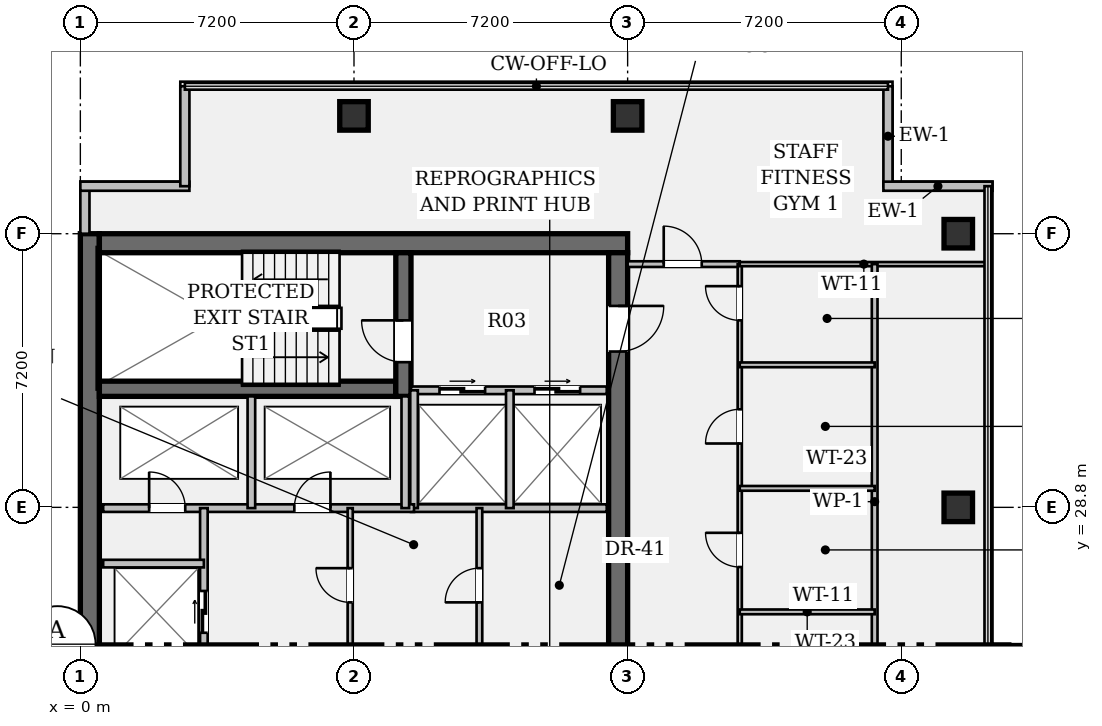
"""IFC4 building model, lengths in metres.
Left out: names, types, materials, properties, quantities, classifications, styles, units other than length and angle.
Written with IfcOpenShell. Run it as: python <this file> out.ifc"""

import sys

from ifc_helpers import new_model, si_unit, direction, frame, frame_2d, origin, origin_2d, place, context, subcontext, project, spatial, rectangle, hollow_rectangle, extrude, element, fill, save


model = new_model("IFC4")
c1 = context("Model", 3, precision=1e-05, world=origin(), true_north=direction((0.0, 1.0)))
c2 = subcontext(c1, "Body", "Model", "MODEL_VIEW")
j1 = project(units=[si_unit("LENGTHUNIT", "METRE"), si_unit("PLANEANGLEUNIT", "RADIAN")], contexts=[c1])
p1 = place(None, origin())
s1 = spatial("IfcSite", under=j1, at=p1, CompositionType="ELEMENT")
p2 = place(p1, origin())
s2 = spatial("IfcBuilding", under=s1, at=p2, CompositionType="ELEMENT")
p3 = place(p2, frame((0.0, 0.0, 208.25)))
s3 = spatial("IfcBuildingStorey", under=s2, at=p3, CompositionType="ELEMENT", Elevation=208.25)
p4 = place(p3, frame((0.25, 7.2, 0.0), z_axis=(0.0, 0.0, 1.0), x_axis=(0.0, 1.0, 0.0)))
e1 = element("IfcWall", 1, at=p4, inside=s3, PredefinedType="SHEAR", context=c2, shape_type="SweptSolid", body=[
    extrude(rectangle(XDim=28.8, YDim=0.5, at=frame_2d((14.4, 0.0))), origin(), (0.0, 0.0, 1.0), 3.24),
])
p5 = place(p3, frame((0.5, 35.75, 0.0), z_axis=(0.0, 0.0, 1.0), x_axis=(1.0, 0.0, 0.0)))
e2 = element("IfcWall", 2, at=p5, inside=s3, PredefinedType="SHEAR", context=c2, shape_type="SweptSolid", body=[
    extrude(rectangle(XDim=13.9, YDim=0.5, at=frame_2d((6.95, 0.0))), origin(), (0.0, 0.0, 1.0), 3.24),
])
p6 = place(p3, frame((14.15, 35.5, 0.0), z_axis=(0.0, 0.0, 1.0), x_axis=(0.0, -1.0, 0.0)))
e3 = element("IfcWall", 3, at=p6, inside=s3, PredefinedType="SHEAR", context=c2, shape_type="SweptSolid", body=[
    extrude(rectangle(XDim=27.8, YDim=0.5, at=frame_2d((13.9, 0.0))), origin(), (0.0, 0.0, 1.0), 3.24),
])
p7 = place(p6, frame((1.4, 0.0, 0.0)))
e4 = element("IfcOpeningElement", 4, at=p7, cuts=e3, PredefinedType="OPENING", context=c2, shape_type="SweptSolid", body=[
    extrude(rectangle(XDim=1.2, YDim=2.15, at=frame_2d((0.6, 1.075))), frame((0.0, 0.262, 0.0), z_axis=(0.0, -1.0, 0.0), x_axis=(1.0, 0.0, 0.0)), (0.0, 0.0, 1.0), 0.524),
])
p8 = place(p6, frame((25.35, 0.0, 0.0)))
e5 = element("IfcOpeningElement", 5, at=p8, cuts=e3, PredefinedType="OPENING", context=c2, shape_type="SweptSolid", body=[
    extrude(rectangle(XDim=1.2, YDim=2.15, at=frame_2d((0.6, 1.075))), frame((0.0, 0.262, 0.0), z_axis=(0.0, -1.0, 0.0), x_axis=(1.0, 0.0, 0.0)), (0.0, 0.0, 1.0), 0.524),
])
p9 = place(p6, frame((14.7, 0.0, 0.0)))
e6 = element("IfcOpeningElement", 6, at=p9, cuts=e3, PredefinedType="OPENING", context=c2, shape_type="SweptSolid", body=[
    extrude(rectangle(XDim=1.6, YDim=2.2, at=frame_2d((0.8, 1.1))), frame((0.0, 0.262, 0.0), z_axis=(0.0, -1.0, 0.0), x_axis=(1.0, 0.0, 0.0)), (0.0, 0.0, 1.0), 0.524),
])
p10 = place(p3, frame((0.5, 31.92, 0.0), z_axis=(0.0, 0.0, 1.0), x_axis=(1.0, 0.0, 0.0)))
e7 = element("IfcWall", 7, at=p10, inside=s3, PredefinedType="SHEAR", context=c2, shape_type="SweptSolid", body=[
    extrude(rectangle(XDim=7.8, YDim=0.4, at=frame_2d((3.9, 0.0))), origin(), (0.0, 0.0, 1.0), 3.24),
])
p11 = place(p3, frame((8.5, 31.72, 0.0), z_axis=(0.0, 0.0, 1.0), x_axis=(0.0, 1.0, 0.0)))
e8 = element("IfcWall", 8, at=p11, inside=s3, PredefinedType="SHEAR", context=c2, shape_type="SweptSolid", body=[
    extrude(rectangle(XDim=3.78, YDim=0.4, at=frame_2d((1.89, 0.0))), origin(), (0.0, 0.0, 1.0), 3.24),
])
p12 = place(p11, frame((0.9, 0.0, 0.0)))
e9 = element("IfcOpeningElement", 9, at=p12, cuts=e8, PredefinedType="OPENING", context=c2, shape_type="SweptSolid", body=[
    extrude(rectangle(XDim=1.1, YDim=2.15, at=frame_2d((0.55, 1.075))), frame((0.0, 0.212, 0.0), z_axis=(0.0, -1.0, 0.0), x_axis=(1.0, 0.0, 0.0)), (0.0, 0.0, 1.0), 0.424),
])
for number, where, z_axis, x_axis in (
    (10, (7.2, 39.1, 0.0), (0.0, 0.0, 1.0), (1.0, 0.0, 0.0)),
    (11, (14.4, 39.1, 0.0), (0.0, 0.0, 1.0), (1.0, 0.0, 0.0)),
    (12, (23.1, 28.8, 0.0), (0.0, 0.0, 1.0), (1.0, 0.0, 0.0)),
    (13, (23.1, 36.0, 0.0), (0.0, 0.0, 1.0), (1.0, 0.0, 0.0)),
):
    element("IfcColumn", number, at=place(p3, frame(where, z_axis=z_axis, x_axis=x_axis)), inside=s3, PredefinedType="COLUMN", context=c2, shape_type="SweptSolid", body=[
        extrude(hollow_rectangle(XDim=0.75, YDim=0.75, WallThickness=0.045, at=origin_2d()), origin(), (0.0, 0.0, 1.0), 3.24),
    ])
p13 = place(p3, frame((0.12, 36.0, 0.0), z_axis=(0.0, 0.0, 1.0), x_axis=(0.0, 1.0, 0.0)))
e14 = element("IfcWall", 14, at=p13, inside=s3, PredefinedType="STANDARD", context=c2, shape_type="SweptSolid", body=[
    extrude(rectangle(XDim=1.25, YDim=0.24, at=frame_2d((0.625, 0.0))), origin(), (0.0, 0.0, 1.0), 3.24),
])
p14 = place(p3, frame((0.0, 37.25, 0.0), z_axis=(0.0, 0.0, 1.0), x_axis=(1.0, 0.0, 0.0)))
e15 = element("IfcWall", 15, at=p14, inside=s3, PredefinedType="STANDARD", context=c2, shape_type="SweptSolid", body=[
    extrude(rectangle(XDim=2.87, YDim=0.24, at=frame_2d((1.435, 0.0))), origin(), (0.0, 0.0, 1.0), 3.24),
])
for number, where, z_axis, x_axis in (
    (16, (2.75, 37.25, 0.0), (0.0, 0.0, 1.0), (0.0, 1.0, 0.0)),
    (17, (21.25, 39.88, 0.0), (0.0, 0.0, 1.0), (0.0, -1.0, 0.0)),
):
    element("IfcWall", number, at=place(p3, frame(where, z_axis=z_axis, x_axis=x_axis)), inside=s3, PredefinedType="STANDARD", context=c2, shape_type="SweptSolid", body=[
        extrude(rectangle(XDim=2.63, YDim=0.24, at=frame_2d((1.315, 0.0))), origin(), (0.0, 0.0, 1.0), 3.24),
    ])
p15 = place(p3, frame((21.13, 37.25, 0.0), z_axis=(0.0, 0.0, 1.0), x_axis=(1.0, 0.0, 0.0)))
e18 = element("IfcWall", 18, at=p15, inside=s3, PredefinedType="STANDARD", context=c2, shape_type="SweptSolid", body=[
    extrude(rectangle(XDim=2.87, YDim=0.24, at=frame_2d((1.435, 0.0))), origin(), (0.0, 0.0, 1.0), 3.24),
])
p16 = place(p3, frame((8.7, 31.88, 0.0), z_axis=(0.0, 0.0, 1.0), x_axis=(1.0, 0.0, 0.0)))
e19 = element("IfcWall", 19, at=p16, inside=s3, PredefinedType="PARTITIONING", context=c2, shape_type="SweptSolid", body=[
    extrude(rectangle(XDim=5.15, YDim=0.2, at=frame_2d((2.575, 0.0))), origin(), (0.0, 0.0, 1.0), 3.24),
])
p17 = place(p16, frame((0.75, 0.0, 0.0)))
e20 = element("IfcOpeningElement", 20, at=p17, cuts=e19, PredefinedType="OPENING", context=c2, shape_type="SweptSolid", body=[
    extrude(rectangle(XDim=1.2, YDim=2.2, at=frame_2d((0.6, 1.1))), frame((0.0, 0.112, 0.0), z_axis=(0.0, -1.0, 0.0), x_axis=(1.0, 0.0, 0.0)), (0.0, 0.0, 1.0), 0.224),
])
p18 = place(p16, frame((3.25, 0.0, 0.0)))
e21 = element("IfcOpeningElement", 21, at=p18, cuts=e19, PredefinedType="OPENING", context=c2, shape_type="SweptSolid", body=[
    extrude(rectangle(XDim=1.2, YDim=2.2, at=frame_2d((0.6, 1.1))), frame((0.0, 0.112, 0.0), z_axis=(0.0, -1.0, 0.0), x_axis=(1.0, 0.0, 0.0)), (0.0, 0.0, 1.0), 0.224),
])
p19 = place(p3, frame((8.7, 28.78, 0.0), z_axis=(0.0, 0.0, 1.0), x_axis=(1.0, 0.0, 0.0)))
e22 = element("IfcWall", 22, at=p19, inside=s3, PredefinedType="PARTITIONING", context=c2, shape_type="SweptSolid", body=[
    extrude(rectangle(XDim=5.15, YDim=0.2, at=frame_2d((2.575, 0.0))), origin(), (0.0, 0.0, 1.0), 3.24),
])
for number, where, z_axis, x_axis in (
    (23, (8.78, 28.78, 0.0), (0.0, 0.0, 1.0), (0.0, 1.0, 0.0)),
    (24, (11.3, 28.78, 0.0), (0.0, 0.0, 1.0), (0.0, 1.0, 0.0)),
):
    element("IfcWall", number, at=place(p3, frame(where, z_axis=z_axis, x_axis=x_axis)), inside=s3, PredefinedType="PARTITIONING", context=c2, shape_type="SweptSolid", body=[
        extrude(rectangle(XDim=3.1, YDim=0.2, at=frame_2d((1.55, 0.0))), origin(), (0.0, 0.0, 1.0), 3.24),
    ])
p20 = place(p3, frame((0.6, 28.78, 0.0), z_axis=(0.0, 0.0, 1.0), x_axis=(1.0, 0.0, 0.0)))
e25 = element("IfcWall", 25, at=p20, inside=s3, PredefinedType="PARTITIONING", context=c2, shape_type="SweptSolid", body=[
    extrude(rectangle(XDim=8.18, YDim=0.2, at=frame_2d((4.09, 0.0))), origin(), (0.0, 0.0, 1.0), 3.24),
])
p21 = place(p20, frame((1.21, 0.0, 0.0)))
e26 = element("IfcOpeningElement", 26, at=p21, cuts=e25, PredefinedType="OPENING", context=c2, shape_type="SweptSolid", body=[
    extrude(rectangle(XDim=0.95, YDim=2.15, at=frame_2d((0.475, 1.075))), frame((0.0, 0.112, 0.0), z_axis=(0.0, -1.0, 0.0), x_axis=(1.0, 0.0, 0.0)), (0.0, 0.0, 1.0), 0.224),
])
p22 = place(p20, frame((5.03, 0.0, 0.0)))
e27 = element("IfcOpeningElement", 27, at=p22, cuts=e25, PredefinedType="OPENING", context=c2, shape_type="SweptSolid", body=[
    extrude(rectangle(XDim=0.95, YDim=2.15, at=frame_2d((0.475, 1.075))), frame((0.0, 0.112, 0.0), z_axis=(0.0, -1.0, 0.0), x_axis=(1.0, 0.0, 0.0)), (0.0, 0.0, 1.0), 0.224),
])
for number, where, z_axis, x_axis in (
    (28, (4.5, 28.78, 0.0), (0.0, 0.0, 1.0), (0.0, 1.0, 0.0)),
    (29, (8.55, 28.78, 0.0), (0.0, 0.0, 1.0), (0.0, 1.0, 0.0)),
):
    element("IfcWall", number, at=place(p3, frame(where, z_axis=z_axis, x_axis=x_axis)), inside=s3, PredefinedType="PARTITIONING", context=c2, shape_type="SweptSolid", body=[
        extrude(rectangle(XDim=2.94, YDim=0.2, at=frame_2d((1.47, 0.0))), origin(), (0.0, 0.0, 1.0), 3.24),
    ])
p23 = place(p3, frame((3.25, 15.7, 0.0), z_axis=(0.0, 0.0, 1.0), x_axis=(0.0, 1.0, 0.0)))
e30 = element("IfcWall", 30, at=p23, inside=s3, PredefinedType="PARTITIONING", context=c2, shape_type="SweptSolid", body=[
    extrude(rectangle(XDim=13.08, YDim=0.2, at=frame_2d((6.54, 0.0))), origin(), (0.0, 0.0, 1.0), 3.24),
])
p24 = place(p23, frame((0.9, 0.0, 0.0)))
e31 = element("IfcOpeningElement", 31, at=p24, cuts=e30, PredefinedType="OPENING", context=c2, shape_type="SweptSolid", body=[
    extrude(rectangle(XDim=1.1, YDim=2.2, at=frame_2d((0.55, 1.1))), frame((0.0, 0.112, 0.0), z_axis=(0.0, -1.0, 0.0), x_axis=(1.0, 0.0, 0.0)), (0.0, 0.0, 1.0), 0.224),
])
p25 = place(p23, frame((3.5, 0.0, 0.0)))
e32 = element("IfcOpeningElement", 32, at=p25, cuts=e30, PredefinedType="OPENING", context=c2, shape_type="SweptSolid", body=[
    extrude(rectangle(XDim=1.1, YDim=2.2, at=frame_2d((0.55, 1.1))), frame((0.0, 0.112, 0.0), z_axis=(0.0, -1.0, 0.0), x_axis=(1.0, 0.0, 0.0)), (0.0, 0.0, 1.0), 0.224),
])
p26 = place(p23, frame((7.2, 0.0, 0.0)))
e33 = element("IfcOpeningElement", 33, at=p26, cuts=e30, PredefinedType="OPENING", context=c2, shape_type="SweptSolid", body=[
    extrude(rectangle(XDim=1.1, YDim=2.2, at=frame_2d((0.55, 1.1))), frame((0.0, 0.112, 0.0), z_axis=(0.0, -1.0, 0.0), x_axis=(1.0, 0.0, 0.0)), (0.0, 0.0, 1.0), 0.224),
])
p27 = place(p23, frame((9.8, 0.0, 0.0)))
e34 = element("IfcOpeningElement", 34, at=p27, cuts=e30, PredefinedType="OPENING", context=c2, shape_type="SweptSolid", body=[
    extrude(rectangle(XDim=1.1, YDim=2.2, at=frame_2d((0.55, 1.1))), frame((0.0, 0.112, 0.0), z_axis=(0.0, -1.0, 0.0), x_axis=(1.0, 0.0, 0.0)), (0.0, 0.0, 1.0), 0.224),
])
p28 = place(p3, frame((0.6, 27.32, 0.0), z_axis=(0.0, 0.0, 1.0), x_axis=(1.0, 0.0, 0.0)))
e35 = element("IfcWall", 35, at=p28, inside=s3, PredefinedType="PARTITIONING", context=c2, shape_type="SweptSolid", body=[
    extrude(rectangle(XDim=2.65, YDim=0.2, at=frame_2d((1.325, 0.0))), origin(), (0.0, 0.0, 1.0), 3.24),
])
p29 = place(p3, frame((7.1, 22.2, 0.0), z_axis=(0.0, 0.0, 1.0), x_axis=(0.0, 1.0, 0.0)))
e36 = element("IfcWall", 36, at=p29, inside=s3, PredefinedType="PARTITIONING", context=c2, shape_type="SweptSolid", body=[
    extrude(rectangle(XDim=6.58, YDim=0.135, at=frame_2d((3.29, 0.0))), origin(), (0.0, 0.0, 1.0), 3.24),
])
p30 = place(p29, frame((4.1, 0.0, 0.0)))
e37 = element("IfcOpeningElement", 37, at=p30, cuts=e36, PredefinedType="OPENING", context=c2, shape_type="SweptSolid", body=[
    extrude(rectangle(XDim=0.9, YDim=2.15, at=frame_2d((0.45, 1.075))), frame((0.0, 0.08, 0.0), z_axis=(0.0, -1.0, 0.0), x_axis=(1.0, 0.0, 0.0)), (0.0, 0.0, 1.0), 0.159),
])
p31 = place(p3, frame((10.5, 25.0, 0.0), z_axis=(0.0, 0.0, 1.0), x_axis=(0.0, 1.0, 0.0)))
e38 = element("IfcWall", 38, at=p31, inside=s3, PredefinedType="PARTITIONING", context=c2, shape_type="SweptSolid", body=[
    extrude(rectangle(XDim=3.78, YDim=0.15, at=frame_2d((1.89, 0.0))), origin(), (0.0, 0.0, 1.0), 3.24),
])
p32 = place(p31, frame((1.3, 0.0, 0.0)))
e39 = element("IfcOpeningElement", 39, at=p32, cuts=e38, PredefinedType="OPENING", context=c2, shape_type="SweptSolid", body=[
    extrude(rectangle(XDim=0.9, YDim=2.15, at=frame_2d((0.45, 1.075))), frame((0.0, 0.087, 0.0), z_axis=(0.0, -1.0, 0.0), x_axis=(1.0, 0.0, 0.0)), (0.0, 0.0, 1.0), 0.174),
])
p33 = place(p3, frame((14.4, 35.2, 0.0), z_axis=(0.0, 0.0, 1.0), x_axis=(1.0, 0.0, 0.0)))
e40 = element("IfcWall", 40, at=p33, inside=s3, PredefinedType="PARTITIONING", context=c2, shape_type="SweptSolid", body=[
    extrude(rectangle(XDim=2.95, YDim=0.15, at=frame_2d((1.475, 0.0))), origin(), (0.0, 0.0, 1.0), 2.808),
])
p34 = place(p33, frame((0.95, 0.0, 0.0)))
e41 = element("IfcOpeningElement", 41, at=p34, cuts=e40, PredefinedType="OPENING", context=c2, shape_type="SweptSolid", body=[
    extrude(rectangle(XDim=1.0, YDim=2.15, at=frame_2d((0.5, 1.075))), frame((0.0, 0.087, 0.0), z_axis=(0.0, -1.0, 0.0), x_axis=(1.0, 0.0, 0.0)), (0.0, 0.0, 1.0), 0.174),
])
p35 = place(p3, frame((17.35, 17.75, 0.0), z_axis=(0.0, 0.0, 1.0), x_axis=(0.0, 1.0, 0.0)))
e42 = element("IfcWall", 42, at=p35, inside=s3, PredefinedType="PARTITIONING", context=c2, shape_type="SweptSolid", body=[
    extrude(rectangle(XDim=17.45, YDim=0.11, at=frame_2d((8.725, 0.0))), origin(), (0.0, 0.0, 1.0), 2.613),
])
p36 = place(p35, frame((6.23, 0.0, 0.0)))
e43 = element("IfcOpeningElement", 43, at=p36, cuts=e42, PredefinedType="OPENING", context=c2, shape_type="SweptSolid", body=[
    extrude(rectangle(XDim=0.9, YDim=2.15, at=frame_2d((0.45, 1.075))), frame((0.0, 0.067, 0.0), z_axis=(0.0, -1.0, 0.0), x_axis=(1.0, 0.0, 0.0)), (0.0, 0.0, 1.0), 0.134),
])
p37 = place(p35, frame((9.48, 0.0, 0.0)))
e44 = element("IfcOpeningElement", 44, at=p37, cuts=e42, PredefinedType="OPENING", context=c2, shape_type="SweptSolid", body=[
    extrude(rectangle(XDim=0.9, YDim=2.15, at=frame_2d((0.45, 1.075))), frame((0.0, 0.067, 0.0), z_axis=(0.0, -1.0, 0.0), x_axis=(1.0, 0.0, 0.0)), (0.0, 0.0, 1.0), 0.134),
])
p38 = place(p35, frame((12.73, 0.0, 0.0)))
e45 = element("IfcOpeningElement", 45, at=p38, cuts=e42, PredefinedType="OPENING", context=c2, shape_type="SweptSolid", body=[
    extrude(rectangle(XDim=0.9, YDim=2.15, at=frame_2d((0.45, 1.075))), frame((0.0, 0.067, 0.0), z_axis=(0.0, -1.0, 0.0), x_axis=(1.0, 0.0, 0.0)), (0.0, 0.0, 1.0), 0.134),
])
p39 = place(p35, frame((15.97, 0.0, 0.0)))
e46 = element("IfcOpeningElement", 46, at=p39, cuts=e42, PredefinedType="OPENING", context=c2, shape_type="SweptSolid", body=[
    extrude(rectangle(XDim=0.9, YDim=2.15, at=frame_2d((0.45, 1.075))), frame((0.0, 0.067, 0.0), z_axis=(0.0, -1.0, 0.0), x_axis=(1.0, 0.0, 0.0)), (0.0, 0.0, 1.0), 0.134),
])
p40 = place(p3, frame((17.35, 35.2, 0.0), z_axis=(0.0, 0.0, 1.0), x_axis=(1.0, 0.0, 0.0)))
e47 = element("IfcWall", 47, at=p40, inside=s3, PredefinedType="PARTITIONING", context=c2, shape_type="SweptSolid", body=[
    extrude(rectangle(XDim=6.53, YDim=0.11, at=frame_2d((3.265, 0.0))), origin(), (0.0, 0.0, 1.0), 2.758),
])
p41 = place(p3, frame((20.9, 22.7, 0.0), z_axis=(0.0, 0.0, 1.0), x_axis=(0.0, 1.0, 0.0)))
e48 = element("IfcWall", 48, at=p41, inside=s3, PredefinedType="PARTITIONING", context=c2, shape_type="SweptSolid", body=[
    extrude(rectangle(XDim=12.5, YDim=0.15, at=frame_2d((6.25, 0.0))), origin(), (0.0, 0.0, 1.0), 2.613),
])
for number, where, z_axis, x_axis in (
    (49, (17.35, 26.05, 0.0), (0.0, 0.0, 1.0), (1.0, 0.0, 0.0)),
    (50, (17.35, 29.3, 0.0), (0.0, 0.0, 1.0), (1.0, 0.0, 0.0)),
    (51, (17.35, 32.55, 0.0), (0.0, 0.0, 1.0), (1.0, 0.0, 0.0)),
):
    element("IfcWall", number, at=place(p3, frame(where, z_axis=z_axis, x_axis=x_axis)), inside=s3, PredefinedType="PARTITIONING", context=c2, shape_type="SweptSolid", body=[
        extrude(rectangle(XDim=3.55, YDim=0.125, at=frame_2d((1.775, 0.0))), origin(), (0.0, 0.0, 1.0), 2.808),
    ])
p42 = place(p12, origin())
e52 = element("IfcDoor", 52, at=p42, inside=s3, OperationType="SINGLE_SWING_RIGHT", PredefinedType="DOOR", context=c2, shape_type="SweptSolid", body=[
    extrude(rectangle(XDim=1.1, YDim=2.15, at=frame_2d((0.55, 1.075))), frame((0.0, 0.025, 0.0), z_axis=(0.0, -1.0, 0.0), x_axis=(1.0, 0.0, 0.0)), (0.0, 0.0, 1.0), 0.05),
])
fill(e9, e52)
p43 = place(p7, origin())
e53 = element("IfcDoor", 53, at=p43, inside=s3, OperationType="SINGLE_SWING_LEFT", PredefinedType="DOOR", context=c2, shape_type="SweptSolid", body=[
    extrude(rectangle(XDim=1.2, YDim=2.15, at=frame_2d((0.6, 1.075))), frame((0.0, 0.025, 0.0), z_axis=(0.0, -1.0, 0.0), x_axis=(1.0, 0.0, 0.0)), (0.0, 0.0, 1.0), 0.05),
])
fill(e4, e53)
p44 = place(p17, origin())
e54 = element("IfcDoor", 54, at=p44, inside=s3, OperationType="DOUBLE_DOOR_SLIDING", PredefinedType="DOOR", context=c2, shape_type="SweptSolid", body=[
    extrude(rectangle(XDim=1.2, YDim=2.2, at=frame_2d((0.6, 1.1))), frame((0.0, 0.025, 0.0), z_axis=(0.0, -1.0, 0.0), x_axis=(1.0, 0.0, 0.0)), (0.0, 0.0, 1.0), 0.05),
])
fill(e20, e54)
p45 = place(p18, origin())
e55 = element("IfcDoor", 55, at=p45, inside=s3, OperationType="DOUBLE_DOOR_SLIDING", PredefinedType="DOOR", context=c2, shape_type="SweptSolid", body=[
    extrude(rectangle(XDim=1.2, YDim=2.2, at=frame_2d((0.6, 1.1))), frame((0.0, 0.025, 0.0), z_axis=(0.0, -1.0, 0.0), x_axis=(1.0, 0.0, 0.0)), (0.0, 0.0, 1.0), 0.05),
])
fill(e21, e55)
p46 = place(p21, origin())
e56 = element("IfcDoor", 56, at=p46, inside=s3, OperationType="SINGLE_SWING_LEFT", PredefinedType="DOOR", context=c2, shape_type="SweptSolid", body=[
    extrude(rectangle(XDim=0.95, YDim=2.15, at=frame_2d((0.475, 1.075))), frame((0.0, 0.025, 0.0), z_axis=(0.0, -1.0, 0.0), x_axis=(1.0, 0.0, 0.0)), (0.0, 0.0, 1.0), 0.05),
])
fill(e26, e56)
p47 = place(p22, origin())
e57 = element("IfcDoor", 57, at=p47, inside=s3, OperationType="SINGLE_SWING_RIGHT", PredefinedType="DOOR", context=c2, shape_type="SweptSolid", body=[
    extrude(rectangle(XDim=0.95, YDim=2.15, at=frame_2d((0.475, 1.075))), frame((0.0, 0.025, 0.0), z_axis=(0.0, -1.0, 0.0), x_axis=(1.0, 0.0, 0.0)), (0.0, 0.0, 1.0), 0.05),
])
fill(e27, e57)
p48 = place(p27, origin())
e58 = element("IfcDoor", 58, at=p48, inside=s3, OperationType="DOUBLE_DOOR_SLIDING", PredefinedType="DOOR", context=c2, shape_type="SweptSolid", body=[
    extrude(rectangle(XDim=1.1, YDim=2.2, at=frame_2d((0.55, 1.1))), frame((0.0, 0.025, 0.0), z_axis=(0.0, -1.0, 0.0), x_axis=(1.0, 0.0, 0.0)), (0.0, 0.0, 1.0), 0.05),
])
fill(e34, e58)
p49 = place(p30, origin())
e59 = element("IfcDoor", 59, at=p49, inside=s3, OperationType="SINGLE_SWING_RIGHT", PredefinedType="DOOR", context=c2, shape_type="SweptSolid", body=[
    extrude(rectangle(XDim=0.9, YDim=2.15, at=frame_2d((0.45, 1.075))), frame((0.0, 0.025, 0.0), z_axis=(0.0, -1.0, 0.0), x_axis=(1.0, 0.0, 0.0)), (0.0, 0.0, 1.0), 0.05),
])
fill(e37, e59)
p50 = place(p32, origin())
e60 = element("IfcDoor", 60, at=p50, inside=s3, OperationType="SINGLE_SWING_LEFT", PredefinedType="DOOR", context=c2, shape_type="SweptSolid", body=[
    extrude(rectangle(XDim=0.9, YDim=2.15, at=frame_2d((0.45, 1.075))), frame((0.0, 0.025, 0.0), z_axis=(0.0, -1.0, 0.0), x_axis=(1.0, 0.0, 0.0)), (0.0, 0.0, 1.0), 0.05),
])
fill(e39, e60)
p51 = place(p34, origin())
e61 = element("IfcDoor", 61, at=p51, inside=s3, OperationType="SINGLE_SWING_LEFT", PredefinedType="DOOR", context=c2, shape_type="SweptSolid", body=[
    extrude(rectangle(XDim=1.0, YDim=2.15, at=frame_2d((0.5, 1.075))), frame((0.0, 0.025, 0.0), z_axis=(0.0, -1.0, 0.0), x_axis=(1.0, 0.0, 0.0)), (0.0, 0.0, 1.0), 0.05),
])
fill(e41, e61)
p52 = place(p37, origin())
e62 = element("IfcDoor", 62, at=p52, inside=s3, OperationType="SINGLE_SWING_RIGHT", PredefinedType="DOOR", context=c2, shape_type="SweptSolid", body=[
    extrude(rectangle(XDim=0.9, YDim=2.15, at=frame_2d((0.45, 1.075))), frame((0.0, 0.025, 0.0), z_axis=(0.0, -1.0, 0.0), x_axis=(1.0, 0.0, 0.0)), (0.0, 0.0, 1.0), 0.05),
])
fill(e44, e62)
p53 = place(p38, origin())
e63 = element("IfcDoor", 63, at=p53, inside=s3, OperationType="SINGLE_SWING_LEFT", PredefinedType="DOOR", context=c2, shape_type="SweptSolid", body=[
    extrude(rectangle(XDim=0.9, YDim=2.15, at=frame_2d((0.45, 1.075))), frame((0.0, 0.025, 0.0), z_axis=(0.0, -1.0, 0.0), x_axis=(1.0, 0.0, 0.0)), (0.0, 0.0, 1.0), 0.05),
])
fill(e45, e63)
p54 = place(p39, origin())
e64 = element("IfcDoor", 64, at=p54, inside=s3, OperationType="SINGLE_SWING_RIGHT", PredefinedType="DOOR", context=c2, shape_type="SweptSolid", body=[
    extrude(rectangle(XDim=0.9, YDim=2.15, at=frame_2d((0.45, 1.075))), frame((0.0, 0.025, 0.0), z_axis=(0.0, -1.0, 0.0), x_axis=(1.0, 0.0, 0.0)), (0.0, 0.0, 1.0), 0.05),
])
fill(e46, e64)
save(model, sys.argv[1])
